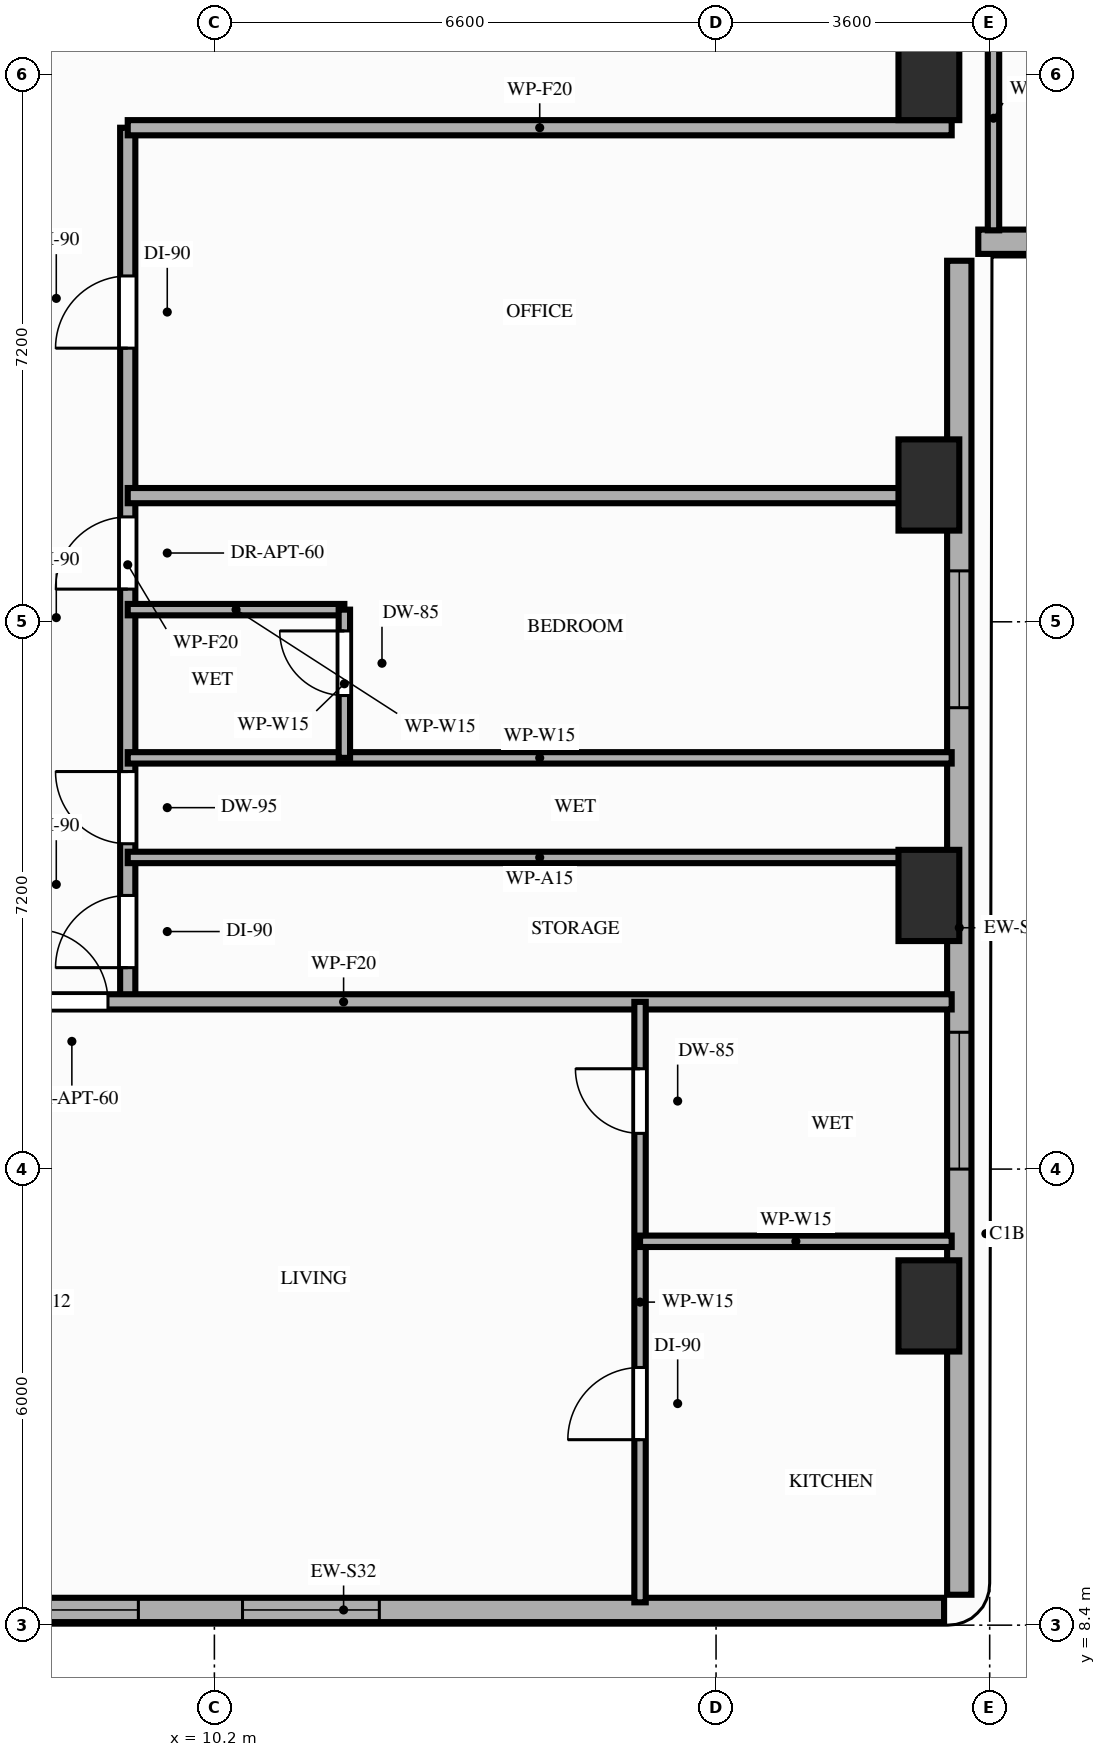
"""IFC4 building model, lengths in metres.
Left out: names, types, materials, properties, quantities, classifications, styles, units other than length and angle.
Written with IfcOpenShell. Run it as: python <this file> out.ifc"""

import sys

from ifc_helpers import new_model, si_unit, direction, frame, frame_2d, origin, origin_2d, place, context, subcontext, project, spatial, rectangle, extrude, element, fill, save


model = new_model("IFC4")
c1 = context("Model", 3, precision=1e-05, world=origin(), true_north=direction((0.0, 1.0)))
c2 = subcontext(c1, "Body", "Model", "MODEL_VIEW")
j1 = project(units=[si_unit("LENGTHUNIT", "METRE"), si_unit("PLANEANGLEUNIT", "RADIAN")], contexts=[c1])
p1 = place(None, origin())
s1 = spatial("IfcSite", under=j1, at=p1, CompositionType="ELEMENT")
p2 = place(p1, origin())
s2 = spatial("IfcBuilding", under=s1, at=p2, CompositionType="ELEMENT")
p3 = place(p2, frame((0.0, 0.0, 86.6)))
s3 = spatial("IfcBuildingStorey", under=s2, at=p3, CompositionType="ELEMENT", Elevation=86.6)
for number, where, z_axis, x_axis in (
    (1, (19.6, 12.6, 0.0), (0.0, 0.0, 1.0), (1.0, 0.0, 0.0)),
    (2, (19.6, 18.0, 0.0), (0.0, 0.0, 1.0), (1.0, 0.0, 0.0)),
    (3, (19.6, 23.4, 0.0), (0.0, 0.0, 1.0), (1.0, 0.0, 0.0)),
    (4, (19.6, 28.8, 0.0), (0.0, 0.0, 1.0), (1.0, 0.0, 0.0)),
):
    element("IfcColumn", number, at=place(p3, frame(where, z_axis=z_axis, x_axis=x_axis)), inside=s3, PredefinedType="COLUMN", context=c2, shape_type="SweptSolid", body=[
        extrude(rectangle(XDim=0.8, YDim=1.2, at=origin_2d()), origin(), (0.0, 0.0, 1.0), 3.2),
    ])
p4 = place(p3, frame((4.0, 8.6, 0.0), z_axis=(0.0, 0.0, 1.0), x_axis=(1.0, 0.0, 0.0)))
e5 = element("IfcWall", 5, at=p4, inside=s3, PredefinedType="STANDARD", context=c2, shape_type="SweptSolid", body=[
    extrude(rectangle(XDim=15.8, YDim=0.32, at=frame_2d((7.9, 0.0))), origin(), (0.0, 0.0, 1.0), 3.02),
])
p5 = place(p4, frame((6.57, 0.0, 0.85)))
e6 = element("IfcOpeningElement", 6, at=p5, cuts=e5, PredefinedType="OPENING", context=c2, shape_type="SweptSolid", body=[
    extrude(rectangle(XDim=1.8, YDim=1.75, at=frame_2d((0.9, 0.875))), frame((0.0, 0.17, 0.0), z_axis=(0.0, -1.0, 0.0), x_axis=(1.0, 0.0, 0.0)), (0.0, 0.0, 1.0), 0.34),
])
p6 = place(p4, frame((3.4, 0.0, 0.85)))
e7 = element("IfcOpeningElement", 7, at=p6, cuts=e5, PredefinedType="OPENING", context=c2, shape_type="SweptSolid", body=[
    extrude(rectangle(XDim=1.8, YDim=1.75, at=frame_2d((0.9, 0.875))), frame((0.0, 0.17, 0.0), z_axis=(0.0, -1.0, 0.0), x_axis=(1.0, 0.0, 0.0)), (0.0, 0.0, 1.0), 0.34),
])
p7 = place(p3, frame((20.0, 8.8, 0.0), z_axis=(0.0, 0.0, 1.0), x_axis=(0.0, 1.0, 0.0)))
e8 = element("IfcWall", 8, at=p7, inside=s3, PredefinedType="STANDARD", context=c2, shape_type="SweptSolid", body=[
    extrude(rectangle(XDim=17.55, YDim=0.32, at=frame_2d((8.775, 0.0))), origin(), (0.0, 0.0, 1.0), 2.4),
])
p8 = place(p7, frame((11.67, 0.0, 0.85)))
e9 = element("IfcOpeningElement", 9, at=p8, cuts=e8, PredefinedType="OPENING", context=c2, shape_type="SweptSolid", body=[
    extrude(rectangle(XDim=1.8, YDim=1.3, at=frame_2d((0.9, 0.65))), frame((0.0, 0.17, 0.0), z_axis=(0.0, -1.0, 0.0), x_axis=(1.0, 0.0, 0.0)), (0.0, 0.0, 1.0), 0.34),
])
p9 = place(p7, frame((5.6, 0.0, 0.85)))
e10 = element("IfcOpeningElement", 10, at=p9, cuts=e8, PredefinedType="OPENING", context=c2, shape_type="SweptSolid", body=[
    extrude(rectangle(XDim=1.8, YDim=1.3, at=frame_2d((0.9, 0.65))), frame((0.0, 0.17, 0.0), z_axis=(0.0, -1.0, 0.0), x_axis=(1.0, 0.0, 0.0)), (0.0, 0.0, 1.0), 0.34),
])
p10 = place(p3, frame((20.25, 26.6, 0.0), z_axis=(0.0, 0.0, 1.0), x_axis=(1.0, 0.0, 0.0)))
e11 = element("IfcWall", 11, at=p10, inside=s3, PredefinedType="STANDARD", context=c2, shape_type="SweptSolid", body=[
    extrude(rectangle(XDim=26.15, YDim=0.32, at=frame_2d((13.075, 0.0))), origin(), (0.0, 0.0, 1.0), 2.7),
])
p11 = place(p10, frame((7.95, 0.0, 0.0)))
e12 = element("IfcOpeningElement", 12, at=p11, cuts=e11, PredefinedType="OPENING", context=c2, shape_type="SweptSolid", body=[
    extrude(rectangle(XDim=1.4, YDim=2.1, at=frame_2d((0.7, 1.05))), frame((0.0, 0.17, 0.0), z_axis=(0.0, -1.0, 0.0), x_axis=(1.0, 0.0, 0.0)), (0.0, 0.0, 1.0), 0.34),
])
p12 = place(p10, frame((22.45, 0.0, 0.0)))
e13 = element("IfcOpeningElement", 13, at=p12, cuts=e11, PredefinedType="OPENING", context=c2, shape_type="SweptSolid", body=[
    extrude(rectangle(XDim=1.4, YDim=2.1, at=frame_2d((0.7, 1.05))), frame((0.0, 0.17, 0.0), z_axis=(0.0, -1.0, 0.0), x_axis=(1.0, 0.0, 0.0)), (0.0, 0.0, 1.0), 0.34),
])
p13 = place(p10, frame((2.25, 0.0, 0.85)))
e14 = element("IfcOpeningElement", 14, at=p13, cuts=e11, PredefinedType="OPENING", context=c2, shape_type="SweptSolid", body=[
    extrude(rectangle(XDim=1.8, YDim=1.6, at=frame_2d((0.9, 0.8))), frame((0.0, 0.17, 0.0), z_axis=(0.0, -1.0, 0.0), x_axis=(1.0, 0.0, 0.0)), (0.0, 0.0, 1.0), 0.34),
])
p14 = place(p10, frame((13.65, 0.0, 0.85)))
e15 = element("IfcOpeningElement", 15, at=p14, cuts=e11, PredefinedType="OPENING", context=c2, shape_type="SweptSolid", body=[
    extrude(rectangle(XDim=1.8, YDim=1.6, at=frame_2d((0.9, 0.8))), frame((0.0, 0.17, 0.0), z_axis=(0.0, -1.0, 0.0), x_axis=(1.0, 0.0, 0.0)), (0.0, 0.0, 1.0), 0.34),
])
p15 = place(p3, frame((9.06, 16.6, 0.0), z_axis=(0.0, 0.0, 1.0), x_axis=(0.0, 1.0, 0.0)))
e16 = element("IfcWall", 16, at=p15, inside=s3, PredefinedType="PARTITIONING", context=c2, shape_type="SweptSolid", body=[
    extrude(rectangle(XDim=11.5, YDim=0.2, at=frame_2d((5.75, 0.0))), origin(), (0.0, 0.0, 1.0), 2.4),
])
p16 = place(p15, frame((0.45, 0.0, 0.0)))
e17 = element("IfcOpeningElement", 17, at=p16, cuts=e16, PredefinedType="OPENING", context=c2, shape_type="SweptSolid", body=[
    extrude(rectangle(XDim=0.95, YDim=2.15, at=frame_2d((0.475, 1.075))), frame((0.0, 0.11, 0.0), z_axis=(0.0, -1.0, 0.0), x_axis=(1.0, 0.0, 0.0)), (0.0, 0.0, 1.0), 0.22),
])
p17 = place(p15, frame((2.08, 0.0, 0.0)))
e18 = element("IfcOpeningElement", 18, at=p17, cuts=e16, PredefinedType="OPENING", context=c2, shape_type="SweptSolid", body=[
    extrude(rectangle(XDim=0.95, YDim=2.1, at=frame_2d((0.475, 1.05))), frame((0.0, 0.11, 0.0), z_axis=(0.0, -1.0, 0.0), x_axis=(1.0, 0.0, 0.0)), (0.0, 0.0, 1.0), 0.22),
])
p18 = place(p15, frame((8.6, 0.0, 0.0)))
e19 = element("IfcOpeningElement", 19, at=p18, cuts=e16, PredefinedType="OPENING", context=c2, shape_type="SweptSolid", body=[
    extrude(rectangle(XDim=0.95, YDim=2.15, at=frame_2d((0.475, 1.075))), frame((0.0, 0.11, 0.0), z_axis=(0.0, -1.0, 0.0), x_axis=(1.0, 0.0, 0.0)), (0.0, 0.0, 1.0), 0.22),
])
p19 = place(p15, frame((5.43, 0.0, 0.0)))
e20 = element("IfcOpeningElement", 20, at=p19, cuts=e16, PredefinedType="OPENING", context=c2, shape_type="SweptSolid", body=[
    extrude(rectangle(XDim=0.95, YDim=2.15, at=frame_2d((0.475, 1.075))), frame((0.0, 0.11, 0.0), z_axis=(0.0, -1.0, 0.0), x_axis=(1.0, 0.0, 0.0)), (0.0, 0.0, 1.0), 0.22),
])
p20 = place(p3, frame((3.9, 16.6, 0.0), z_axis=(0.0, 0.0, 1.0), x_axis=(1.0, 0.0, 0.0)))
e21 = element("IfcWall", 21, at=p20, inside=s3, PredefinedType="PARTITIONING", context=c2, shape_type="SweptSolid", body=[
    extrude(rectangle(XDim=16.0, YDim=0.2, at=frame_2d((8.0, 0.0))), origin(), (0.0, 0.0, 1.0), 2.4),
])
p21 = place(p20, frame((3.95, 0.0, 0.0)))
e22 = element("IfcOpeningElement", 22, at=p21, cuts=e21, PredefinedType="OPENING", context=c2, shape_type="SweptSolid", body=[
    extrude(rectangle(XDim=0.95, YDim=2.15, at=frame_2d((0.475, 1.075))), frame((0.0, 0.11, 0.0), z_axis=(0.0, -1.0, 0.0), x_axis=(1.0, 0.0, 0.0)), (0.0, 0.0, 1.0), 0.22),
])
p22 = place(p3, frame((9.06, 28.1, 0.0), z_axis=(0.0, 0.0, 1.0), x_axis=(1.0, 0.0, 0.0)))
e23 = element("IfcWall", 23, at=p22, inside=s3, PredefinedType="PARTITIONING", context=c2, shape_type="SweptSolid", body=[
    extrude(rectangle(XDim=10.84, YDim=0.2, at=frame_2d((5.42, 0.0))), origin(), (0.0, 0.0, 1.0), 2.4),
])
p23 = place(p3, frame((20.45, 26.75, 0.0), z_axis=(0.0, 0.0, 1.0), x_axis=(0.0, 1.0, 0.0)))
e24 = element("IfcWall", 24, at=p23, inside=s3, PredefinedType="PARTITIONING", context=c2, shape_type="SweptSolid", body=[
    extrude(rectangle(XDim=2.95, YDim=0.15, at=frame_2d((1.475, 0.0))), origin(), (0.0, 0.0, 1.0), 2.4),
])
p24 = place(p3, frame((15.8, 8.7, 0.0), z_axis=(0.0, 0.0, 1.0), x_axis=(0.0, 1.0, 0.0)))
e25 = element("IfcWall", 25, at=p24, inside=s3, PredefinedType="PARTITIONING", context=c2, shape_type="SweptSolid", body=[
    extrude(rectangle(XDim=7.9, YDim=0.15, at=frame_2d((3.95, 0.0))), origin(), (0.0, 0.0, 1.0), 2.4),
])
p25 = place(p24, frame((2.14, 0.0, 0.0)))
e26 = element("IfcOpeningElement", 26, at=p25, cuts=e25, PredefinedType="OPENING", context=c2, shape_type="SweptSolid", body=[
    extrude(rectangle(XDim=0.95, YDim=2.15, at=frame_2d((0.475, 1.075))), frame((0.0, 0.085, 0.0), z_axis=(0.0, -1.0, 0.0), x_axis=(1.0, 0.0, 0.0)), (0.0, 0.0, 1.0), 0.17),
])
p26 = place(p24, frame((6.17, 0.0, 0.0)))
e27 = element("IfcOpeningElement", 27, at=p26, cuts=e25, PredefinedType="OPENING", context=c2, shape_type="SweptSolid", body=[
    extrude(rectangle(XDim=0.85, YDim=2.1, at=frame_2d((0.425, 1.05))), frame((0.0, 0.085, 0.0), z_axis=(0.0, -1.0, 0.0), x_axis=(1.0, 0.0, 0.0)), (0.0, 0.0, 1.0), 0.17),
])
p27 = place(p3, frame((15.8, 13.45, 0.0), z_axis=(0.0, 0.0, 1.0), x_axis=(1.0, 0.0, 0.0)))
e28 = element("IfcWall", 28, at=p27, inside=s3, PredefinedType="PARTITIONING", context=c2, shape_type="SweptSolid", body=[
    extrude(rectangle(XDim=4.1, YDim=0.15, at=frame_2d((2.05, 0.0))), origin(), (0.0, 0.0, 1.0), 2.4),
])
for number, where, z_axis, x_axis in (
    (29, (9.06, 18.5, 0.0), (0.0, 0.0, 1.0), (1.0, 0.0, 0.0)),
    (30, (9.06, 19.81, 0.0), (0.0, 0.0, 1.0), (1.0, 0.0, 0.0)),
):
    element("IfcWall", number, at=place(p3, frame(where, z_axis=z_axis, x_axis=x_axis)), inside=s3, PredefinedType="PARTITIONING", context=c2, shape_type="SweptSolid", body=[
        extrude(rectangle(XDim=10.84, YDim=0.15, at=frame_2d((5.42, 0.0))), origin(), (0.0, 0.0, 1.0), 2.4),
    ])
p28 = place(p3, frame((9.06, 23.26, 0.0), z_axis=(0.0, 0.0, 1.0), x_axis=(1.0, 0.0, 0.0)))
e31 = element("IfcWall", 31, at=p28, inside=s3, PredefinedType="PARTITIONING", context=c2, shape_type="SweptSolid", body=[
    extrude(rectangle(XDim=10.84, YDim=0.2, at=frame_2d((5.42, 0.0))), origin(), (0.0, 0.0, 1.0), 2.4),
])
p29 = place(p3, frame((9.06, 21.76, 0.0), z_axis=(0.0, 0.0, 1.0), x_axis=(1.0, 0.0, 0.0)))
e32 = element("IfcWall", 32, at=p29, inside=s3, PredefinedType="PARTITIONING", context=c2, shape_type="SweptSolid", body=[
    extrude(rectangle(XDim=2.85, YDim=0.15, at=frame_2d((1.425, 0.0))), origin(), (0.0, 0.0, 1.0), 2.6),
])
p30 = place(p3, frame((11.91, 19.81, 0.0), z_axis=(0.0, 0.0, 1.0), x_axis=(0.0, 1.0, 0.0)))
e33 = element("IfcWall", 33, at=p30, inside=s3, PredefinedType="PARTITIONING", context=c2, shape_type="SweptSolid", body=[
    extrude(rectangle(XDim=1.95, YDim=0.15, at=frame_2d((0.975, 0.0))), origin(), (0.0, 0.0, 1.0), 2.6),
])
p31 = place(p30, frame((0.82, 0.0, 0.0)))
e34 = element("IfcOpeningElement", 34, at=p31, cuts=e33, PredefinedType="OPENING", context=c2, shape_type="SweptSolid", body=[
    extrude(rectangle(XDim=0.85, YDim=2.1, at=frame_2d((0.425, 1.05))), frame((0.0, 0.085, 0.0), z_axis=(0.0, -1.0, 0.0), x_axis=(1.0, 0.0, 0.0)), (0.0, 0.0, 1.0), 0.17),
])
p32 = place(p5, origin())
e35 = element("IfcWindow", 35, at=p32, inside=s3, PartitioningType="SINGLE_PANEL", PredefinedType="WINDOW", context=c2, shape_type="SweptSolid", body=[
    extrude(rectangle(XDim=1.8, YDim=1.75, at=frame_2d((0.9, 0.875))), frame((0.0, 0.03, 0.0), z_axis=(0.0, -1.0, 0.0), x_axis=(1.0, 0.0, 0.0)), (0.0, 0.0, 1.0), 0.06),
])
fill(e6, e35)
p33 = place(p8, origin())
e36 = element("IfcWindow", 36, at=p33, inside=s3, PartitioningType="SINGLE_PANEL", PredefinedType="WINDOW", context=c2, shape_type="SweptSolid", body=[
    extrude(rectangle(XDim=1.8, YDim=1.3, at=frame_2d((0.9, 0.65))), frame((0.0, 0.03, 0.0), z_axis=(0.0, -1.0, 0.0), x_axis=(1.0, 0.0, 0.0)), (0.0, 0.0, 1.0), 0.06),
])
fill(e9, e36)
p34 = place(p9, origin())
e37 = element("IfcWindow", 37, at=p34, inside=s3, PartitioningType="SINGLE_PANEL", PredefinedType="WINDOW", context=c2, shape_type="SweptSolid", body=[
    extrude(rectangle(XDim=1.8, YDim=1.3, at=frame_2d((0.9, 0.65))), frame((0.0, 0.03, 0.0), z_axis=(0.0, -1.0, 0.0), x_axis=(1.0, 0.0, 0.0)), (0.0, 0.0, 1.0), 0.06),
])
fill(e10, e37)
p35 = place(p6, origin())
e38 = element("IfcWindow", 38, at=p35, inside=s3, PartitioningType="SINGLE_PANEL", PredefinedType="WINDOW", context=c2, shape_type="SweptSolid", body=[
    extrude(rectangle(XDim=1.8, YDim=1.75, at=frame_2d((0.9, 0.875))), frame((0.0, 0.03, 0.0), z_axis=(0.0, -1.0, 0.0), x_axis=(1.0, 0.0, 0.0)), (0.0, 0.0, 1.0), 0.06),
])
fill(e7, e38)
p36 = place(p21, origin())
e39 = element("IfcDoor", 39, at=p36, inside=s3, OperationType="SINGLE_SWING_LEFT", PredefinedType="DOOR", context=c2, shape_type="SweptSolid", body=[
    extrude(rectangle(XDim=0.95, YDim=2.15, at=frame_2d((0.475, 1.075))), frame((0.0, 0.025, 0.0), z_axis=(0.0, -1.0, 0.0), x_axis=(1.0, 0.0, 0.0)), (0.0, 0.0, 1.0), 0.05),
])
fill(e22, e39)
p37 = place(p25, origin())
e40 = element("IfcDoor", 40, at=p37, inside=s3, OperationType="SINGLE_SWING_LEFT", PredefinedType="DOOR", context=c2, shape_type="SweptSolid", body=[
    extrude(rectangle(XDim=0.95, YDim=2.15, at=frame_2d((0.475, 1.075))), frame((0.0, 0.025, 0.0), z_axis=(0.0, -1.0, 0.0), x_axis=(1.0, 0.0, 0.0)), (0.0, 0.0, 1.0), 0.05),
])
fill(e26, e40)
p38 = place(p26, origin())
e41 = element("IfcDoor", 41, at=p38, inside=s3, OperationType="SINGLE_SWING_RIGHT", PredefinedType="DOOR", context=c2, shape_type="SweptSolid", body=[
    extrude(rectangle(XDim=0.85, YDim=2.1, at=frame_2d((0.425, 1.05))), frame((0.0, 0.025, 0.0), z_axis=(0.0, -1.0, 0.0), x_axis=(1.0, 0.0, 0.0)), (0.0, 0.0, 1.0), 0.05),
])
fill(e27, e41)
p39 = place(p16, origin())
e42 = element("IfcDoor", 42, at=p39, inside=s3, OperationType="SINGLE_SWING_LEFT", PredefinedType="DOOR", context=c2, shape_type="SweptSolid", body=[
    extrude(rectangle(XDim=0.95, YDim=2.15, at=frame_2d((0.475, 1.075))), frame((0.0, 0.025, 0.0), z_axis=(0.0, -1.0, 0.0), x_axis=(1.0, 0.0, 0.0)), (0.0, 0.0, 1.0), 0.05),
])
fill(e17, e42)
p40 = place(p17, origin())
e43 = element("IfcDoor", 43, at=p40, inside=s3, OperationType="SINGLE_SWING_RIGHT", PredefinedType="DOOR", context=c2, shape_type="SweptSolid", body=[
    extrude(rectangle(XDim=0.95, YDim=2.1, at=frame_2d((0.475, 1.05))), frame((0.0, 0.025, 0.0), z_axis=(0.0, -1.0, 0.0), x_axis=(1.0, 0.0, 0.0)), (0.0, 0.0, 1.0), 0.05),
])
fill(e18, e43)
p41 = place(p18, origin())
e44 = element("IfcDoor", 44, at=p41, inside=s3, OperationType="SINGLE_SWING_LEFT", PredefinedType="DOOR", context=c2, shape_type="SweptSolid", body=[
    extrude(rectangle(XDim=0.95, YDim=2.15, at=frame_2d((0.475, 1.075))), frame((0.0, 0.025, 0.0), z_axis=(0.0, -1.0, 0.0), x_axis=(1.0, 0.0, 0.0)), (0.0, 0.0, 1.0), 0.05),
])
fill(e19, e44)
p42 = place(p31, origin())
e45 = element("IfcDoor", 45, at=p42, inside=s3, OperationType="SINGLE_SWING_RIGHT", PredefinedType="DOOR", context=c2, shape_type="SweptSolid", body=[
    extrude(rectangle(XDim=0.85, YDim=2.1, at=frame_2d((0.425, 1.05))), frame((0.0, 0.025, 0.0), z_axis=(0.0, -1.0, 0.0), x_axis=(1.0, 0.0, 0.0)), (0.0, 0.0, 1.0), 0.05),
])
fill(e34, e45)
p43 = place(p19, origin())
e46 = element("IfcDoor", 46, at=p43, inside=s3, OperationType="SINGLE_SWING_LEFT", PredefinedType="DOOR", context=c2, shape_type="SweptSolid", body=[
    extrude(rectangle(XDim=0.95, YDim=2.15, at=frame_2d((0.475, 1.075))), frame((0.0, 0.025, 0.0), z_axis=(0.0, -1.0, 0.0), x_axis=(1.0, 0.0, 0.0)), (0.0, 0.0, 1.0), 0.05),
])
fill(e20, e46)
save(model, sys.argv[1])
